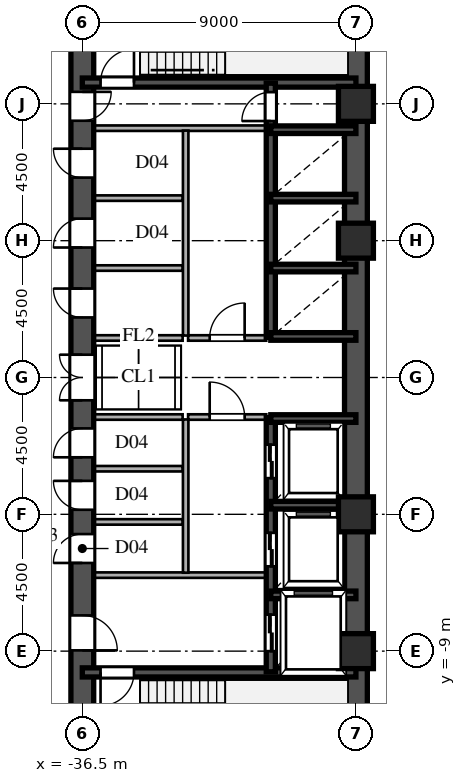
"""IFC4 building model, lengths in metres.
Left out: names, types, materials, properties, quantities, classifications, styles, units other than length and angle.
Written with IfcOpenShell. Run it as: python <this file> out.ifc"""

import sys

from ifc_helpers import new_model, si_unit, direction, frame, frame_2d, origin, origin_2d, place, context, subcontext, project, spatial, rectangle, hollow_rectangle, extrude, source, transform, mapped, element, fill, save


model = new_model("IFC4")
c1 = context("Model", 3, precision=1e-05, world=origin(), true_north=direction((0.0, 1.0)))
c2 = subcontext(c1, "Body", "Model", "MODEL_VIEW")
j1 = project(units=[si_unit("LENGTHUNIT", "METRE"), si_unit("PLANEANGLEUNIT", "RADIAN")], contexts=[c1])
p1 = place(None, origin())
s1 = spatial("IfcSite", under=j1, at=p1, CompositionType="ELEMENT")
p2 = place(p1, origin())
s2 = spatial("IfcBuilding", under=s1, at=p2, CompositionType="ELEMENT")
p3 = place(p2, frame((0.0, 0.0, 36.9)))
s3 = spatial("IfcBuildingStorey", under=s2, at=p3, CompositionType="ELEMENT", Elevation=36.9)
m1 = source(origin(), c2, "Body", "SweptSolid", [
    extrude(hollow_rectangle(XDim=1.15, YDim=1.15, WallThickness=0.048, at=origin_2d()), origin(), (0.0, 0.0, 1.0), 3.6),
])
for number, where, z_axis, x_axis in (
    (1, (-27.5, -9.0, 0.0), (0.0, 0.0, 1.0), (1.0, 0.0, 0.0)),
    (2, (-27.5, -4.5, 0.0), (0.0, 0.0, 1.0), (1.0, 0.0, 0.0)),
    (3, (-27.5, 4.5, 0.0), (0.0, 0.0, 1.0), (1.0, 0.0, 0.0)),
    (4, (-27.5, 9.0, 0.0), (0.0, 0.0, 1.0), (1.0, 0.0, 0.0)),
):
    element("IfcColumn", number, at=place(p3, frame(where, z_axis=z_axis, x_axis=x_axis)), inside=s3, PredefinedType="COLUMN", context=c2, shape_type="MappedRepresentation", body=[
        mapped(m1, transform((0.0, 0.0, 0.0), scale=1.0)),
    ])
for number, where, z_axis, x_axis in (
    (5, (-27.5, -13.5, 0.0), (0.0, 0.0, 1.0), (0.0, 1.0, 0.0)),
    (6, (-27.5, 1.3, 0.0), (0.0, 0.0, 1.0), (0.0, 1.0, 0.0)),
):
    element("IfcWall", number, at=place(p3, frame(where, z_axis=z_axis, x_axis=x_axis)), inside=s3, PredefinedType="SHEAR", context=c2, shape_type="SweptSolid", body=[
        extrude(rectangle(XDim=12.2, YDim=0.75, at=frame_2d((6.1, 0.0))), origin(), (0.0, 0.0, 1.0), 3.38),
    ])
p4 = place(p3, frame((-27.5, -1.3, 0.0), z_axis=(0.0, 0.0, 1.0), x_axis=(0.0, 1.0, 0.0)))
e7 = element("IfcWall", 7, at=p4, inside=s3, PredefinedType="SHEAR", context=c2, shape_type="SweptSolid", body=[
    extrude(rectangle(XDim=2.6, YDim=0.75, at=frame_2d((1.3, 0.0))), origin(), (0.0, 0.0, 1.0), 3.38),
])
p5 = place(p3, frame((-36.5, -13.65, 0.0), z_axis=(0.0, 0.0, 1.0), x_axis=(0.0, 1.0, 0.0)))
e8 = element("IfcWall", 8, at=p5, inside=s3, PredefinedType="SHEAR", context=c2, shape_type="SweptSolid", body=[
    extrude(rectangle(XDim=7.15, YDim=0.75, at=frame_2d((3.575, 0.0))), origin(), (0.0, 0.0, 1.0), 3.38),
])
p6 = place(p5, frame((4.675, 0.0, 0.0)))
e9 = element("IfcOpeningElement", 9, at=p6, cuts=e8, PredefinedType="OPENING", context=c2, shape_type="SweptSolid", body=[
    extrude(rectangle(XDim=1.15, YDim=2.2, at=frame_2d((0.575, 1.1))), frame((0.0, 0.385, 0.0), z_axis=(0.0, -1.0, 0.0), x_axis=(1.0, 0.0, 0.0)), (0.0, 0.0, 1.0), 0.77),
])
p7 = place(p3, frame((-36.5, -1.3, 0.0), z_axis=(0.0, 0.0, 1.0), x_axis=(0.0, 1.0, 0.0)))
e10 = element("IfcWall", 10, at=p7, inside=s3, PredefinedType="SHEAR", context=c2, shape_type="SweptSolid", body=[
    extrude(rectangle(XDim=2.6, YDim=0.75, at=frame_2d((1.3, 0.0))), origin(), (0.0, 0.0, 1.0), 3.38),
])
p8 = place(p7, frame((0.55, 0.0, 0.0)))
e11 = element("IfcOpeningElement", 11, at=p8, cuts=e10, PredefinedType="OPENING", context=c2, shape_type="SweptSolid", body=[
    extrude(rectangle(XDim=1.5, YDim=2.3, at=frame_2d((0.75, 1.15))), frame((0.0, 0.385, 0.0), z_axis=(0.0, -1.0, 0.0), x_axis=(1.0, 0.0, 0.0)), (0.0, 0.0, 1.0), 0.77),
])
p9 = place(p3, frame((-36.5, 8.2, 0.0), z_axis=(0.0, 0.0, 1.0), x_axis=(0.0, 1.0, 0.0)))
e12 = element("IfcWall", 12, at=p9, inside=s3, PredefinedType="SHEAR", context=c2, shape_type="SweptSolid", body=[
    extrude(rectangle(XDim=5.45, YDim=0.75, at=frame_2d((2.725, 0.0))), origin(), (0.0, 0.0, 1.0), 3.38),
])
p10 = place(p9, frame((0.245, 0.0, 0.0)))
e13 = element("IfcOpeningElement", 13, at=p10, cuts=e12, PredefinedType="OPENING", context=c2, shape_type="SweptSolid", body=[
    extrude(rectangle(XDim=0.95, YDim=2.15, at=frame_2d((0.475, 1.075))), frame((0.0, 0.385, 0.0), z_axis=(0.0, -1.0, 0.0), x_axis=(1.0, 0.0, 0.0)), (0.0, 0.0, 1.0), 0.77),
])
p11 = place(p3, frame((-36.5, -6.5, 0.0), z_axis=(0.0, 0.0, 1.0), x_axis=(0.0, 1.0, 0.0)))
e14 = element("IfcWall", 14, at=p11, inside=s3, PredefinedType="SHEAR", context=c2, shape_type="SweptSolid", body=[
    extrude(rectangle(XDim=1.75, YDim=0.75, at=frame_2d((0.875, 0.0))), origin(), (0.0, 0.0, 1.0), 3.38),
])
p12 = place(p11, frame((0.4, 0.0, 0.0)))
e15 = element("IfcOpeningElement", 15, at=p12, cuts=e14, PredefinedType="OPENING", context=c2, shape_type="SweptSolid", body=[
    extrude(rectangle(XDim=0.95, YDim=2.15, at=frame_2d((0.475, 1.075))), frame((0.0, 0.385, 0.0), z_axis=(0.0, -1.0, 0.0), x_axis=(1.0, 0.0, 0.0)), (0.0, 0.0, 1.0), 0.77),
])
p13 = place(p3, frame((-36.5, -4.75, 0.0), z_axis=(0.0, 0.0, 1.0), x_axis=(0.0, 1.0, 0.0)))
e16 = element("IfcWall", 16, at=p13, inside=s3, PredefinedType="SHEAR", context=c2, shape_type="SweptSolid", body=[
    extrude(rectangle(XDim=1.75, YDim=0.75, at=frame_2d((0.875, 0.0))), origin(), (0.0, 0.0, 1.0), 3.38),
])
p14 = place(p13, frame((0.4, 0.0, 0.0)))
e17 = element("IfcOpeningElement", 17, at=p14, cuts=e16, PredefinedType="OPENING", context=c2, shape_type="SweptSolid", body=[
    extrude(rectangle(XDim=0.95, YDim=2.15, at=frame_2d((0.475, 1.075))), frame((0.0, 0.385, 0.0), z_axis=(0.0, -1.0, 0.0), x_axis=(1.0, 0.0, 0.0)), (0.0, 0.0, 1.0), 0.77),
])
p15 = place(p3, frame((-36.5, -3.0, 0.0), z_axis=(0.0, 0.0, 1.0), x_axis=(0.0, 1.0, 0.0)))
e18 = element("IfcWall", 18, at=p15, inside=s3, PredefinedType="SHEAR", context=c2, shape_type="SweptSolid", body=[
    extrude(rectangle(XDim=1.7, YDim=0.75, at=frame_2d((0.85, 0.0))), origin(), (0.0, 0.0, 1.0), 3.38),
])
p16 = place(p15, frame((0.375, 0.0, 0.0)))
e19 = element("IfcOpeningElement", 19, at=p16, cuts=e18, PredefinedType="OPENING", context=c2, shape_type="SweptSolid", body=[
    extrude(rectangle(XDim=0.95, YDim=2.15, at=frame_2d((0.475, 1.075))), frame((0.0, 0.385, 0.0), z_axis=(0.0, -1.0, 0.0), x_axis=(1.0, 0.0, 0.0)), (0.0, 0.0, 1.0), 0.77),
])
p17 = place(p3, frame((-36.5, 1.3, 0.0), z_axis=(0.0, 0.0, 1.0), x_axis=(0.0, 1.0, 0.0)))
e20 = element("IfcWall", 20, at=p17, inside=s3, PredefinedType="SHEAR", context=c2, shape_type="SweptSolid", body=[
    extrude(rectangle(XDim=2.3, YDim=0.75, at=frame_2d((1.15, 0.0))), origin(), (0.0, 0.0, 1.0), 3.38),
])
p18 = place(p17, frame((0.675, 0.0, 0.0)))
e21 = element("IfcOpeningElement", 21, at=p18, cuts=e20, PredefinedType="OPENING", context=c2, shape_type="SweptSolid", body=[
    extrude(rectangle(XDim=0.95, YDim=2.15, at=frame_2d((0.475, 1.075))), frame((0.0, 0.385, 0.0), z_axis=(0.0, -1.0, 0.0), x_axis=(1.0, 0.0, 0.0)), (0.0, 0.0, 1.0), 0.77),
])
p19 = place(p3, frame((-36.5, 3.6, 0.0), z_axis=(0.0, 0.0, 1.0), x_axis=(0.0, 1.0, 0.0)))
e22 = element("IfcWall", 22, at=p19, inside=s3, PredefinedType="SHEAR", context=c2, shape_type="SweptSolid", body=[
    extrude(rectangle(XDim=2.3, YDim=0.75, at=frame_2d((1.15, 0.0))), origin(), (0.0, 0.0, 1.0), 3.38),
])
p20 = place(p19, frame((0.675, 0.0, 0.0)))
e23 = element("IfcOpeningElement", 23, at=p20, cuts=e22, PredefinedType="OPENING", context=c2, shape_type="SweptSolid", body=[
    extrude(rectangle(XDim=0.95, YDim=2.15, at=frame_2d((0.475, 1.075))), frame((0.0, 0.385, 0.0), z_axis=(0.0, -1.0, 0.0), x_axis=(1.0, 0.0, 0.0)), (0.0, 0.0, 1.0), 0.77),
])
p21 = place(p3, frame((-36.5, 5.9, 0.0), z_axis=(0.0, 0.0, 1.0), x_axis=(0.0, 1.0, 0.0)))
e24 = element("IfcWall", 24, at=p21, inside=s3, PredefinedType="SHEAR", context=c2, shape_type="SweptSolid", body=[
    extrude(rectangle(XDim=2.3, YDim=0.75, at=frame_2d((1.15, 0.0))), origin(), (0.0, 0.0, 1.0), 3.38),
])
p22 = place(p21, frame((0.675, 0.0, 0.0)))
e25 = element("IfcOpeningElement", 25, at=p22, cuts=e24, PredefinedType="OPENING", context=c2, shape_type="SweptSolid", body=[
    extrude(rectangle(XDim=0.95, YDim=2.15, at=frame_2d((0.475, 1.075))), frame((0.0, 0.385, 0.0), z_axis=(0.0, -1.0, 0.0), x_axis=(1.0, 0.0, 0.0)), (0.0, 0.0, 1.0), 0.77),
])
p23 = place(p3, frame((-36.5, -9.7, 0.0), z_axis=(0.0, 0.0, 1.0), x_axis=(1.0, 0.0, 0.0)))
e26 = element("IfcWall", 26, at=p23, inside=s3, PredefinedType="SHEAR", context=c2, shape_type="SweptSolid", body=[
    extrude(rectangle(XDim=9.0, YDim=0.3, at=frame_2d((4.5, 0.0))), origin(), (0.0, 0.0, 1.0), 3.38),
])
p24 = place(p23, frame((0.6, 0.0, 0.0)))
e27 = element("IfcOpeningElement", 27, at=p24, cuts=e26, PredefinedType="OPENING", context=c2, shape_type="SweptSolid", body=[
    extrude(rectangle(XDim=1.1, YDim=2.2, at=frame_2d((0.55, 1.1))), frame((0.0, 0.16, 0.0), z_axis=(0.0, -1.0, 0.0), x_axis=(1.0, 0.0, 0.0)), (0.0, 0.0, 1.0), 0.32),
])
p25 = place(p3, frame((-36.5, 9.7, 0.0), z_axis=(0.0, 0.0, 1.0), x_axis=(1.0, 0.0, 0.0)))
e28 = element("IfcWall", 28, at=p25, inside=s3, PredefinedType="SHEAR", context=c2, shape_type="SweptSolid", body=[
    extrude(rectangle(XDim=9.0, YDim=0.3, at=frame_2d((4.5, 0.0))), origin(), (0.0, 0.0, 1.0), 3.38),
])
p26 = place(p25, frame((0.6, 0.0, 0.0)))
e29 = element("IfcOpeningElement", 29, at=p26, cuts=e28, PredefinedType="OPENING", context=c2, shape_type="SweptSolid", body=[
    extrude(rectangle(XDim=1.1, YDim=2.2, at=frame_2d((0.55, 1.1))), frame((0.0, 0.16, 0.0), z_axis=(0.0, -1.0, 0.0), x_axis=(1.0, 0.0, 0.0)), (0.0, 0.0, 1.0), 0.32),
])
for number, where, z_axis, x_axis in (
    (30, (-30.3, -7.15, 0.0), (0.0, 0.0, 1.0), (1.0, 0.0, 0.0)),
    (31, (-30.3, -4.2, 0.0), (0.0, 0.0, 1.0), (1.0, 0.0, 0.0)),
    (32, (-30.3, -1.35, 0.0), (0.0, 0.0, 1.0), (1.0, 0.0, 0.0)),
    (33, (-30.3, 1.35, 0.0), (0.0, 0.0, 1.0), (1.0, 0.0, 0.0)),
    (34, (-30.3, 3.6, 0.0), (0.0, 0.0, 1.0), (1.0, 0.0, 0.0)),
    (35, (-30.3, 5.9, 0.0), (0.0, 0.0, 1.0), (1.0, 0.0, 0.0)),
    (36, (-30.3, 8.15, 0.0), (0.0, 0.0, 1.0), (1.0, 0.0, 0.0)),
):
    element("IfcWall", number, at=place(p3, frame(where, z_axis=z_axis, x_axis=x_axis)), inside=s3, PredefinedType="SHEAR", context=c2, shape_type="SweptSolid", body=[
        extrude(rectangle(XDim=2.8, YDim=0.25, at=frame_2d((1.4, 0.0))), origin(), (0.0, 0.0, 1.0), 3.38),
    ])
p27 = place(p3, frame((-30.3, -9.68, 0.0), z_axis=(0.0, 0.0, 1.0), x_axis=(0.0, 1.0, 0.0)))
e37 = element("IfcWall", 37, at=p27, inside=s3, PredefinedType="SHEAR", context=c2, shape_type="SweptSolid", body=[
    extrude(rectangle(XDim=2.56, YDim=0.3, at=frame_2d((1.28, 0.0))), origin(), (0.0, 0.0, 1.0), 3.38),
])
p28 = place(p27, frame((0.68, 0.0, 0.0)))
e38 = element("IfcOpeningElement", 38, at=p28, cuts=e37, PredefinedType="OPENING", context=c2, shape_type="SweptSolid", body=[
    extrude(rectangle(XDim=1.2, YDim=2.25, at=frame_2d((0.6, 1.125))), frame((0.0, 0.16, 0.0), z_axis=(0.0, -1.0, 0.0), x_axis=(1.0, 0.0, 0.0)), (0.0, 0.0, 1.0), 0.32),
])
p29 = place(p3, frame((-30.3, -7.12, 0.0), z_axis=(0.0, 0.0, 1.0), x_axis=(0.0, 1.0, 0.0)))
e39 = element("IfcWall", 39, at=p29, inside=s3, PredefinedType="SHEAR", context=c2, shape_type="SweptSolid", body=[
    extrude(rectangle(XDim=2.92, YDim=0.3, at=frame_2d((1.46, 0.0))), origin(), (0.0, 0.0, 1.0), 3.38),
])
p30 = place(p29, frame((0.91, 0.0, 0.0)))
e40 = element("IfcOpeningElement", 40, at=p30, cuts=e39, PredefinedType="OPENING", context=c2, shape_type="SweptSolid", body=[
    extrude(rectangle(XDim=1.1, YDim=2.2, at=frame_2d((0.55, 1.1))), frame((0.0, 0.16, 0.0), z_axis=(0.0, -1.0, 0.0), x_axis=(1.0, 0.0, 0.0)), (0.0, 0.0, 1.0), 0.32),
])
p31 = place(p3, frame((-30.3, -4.2, 0.0), z_axis=(0.0, 0.0, 1.0), x_axis=(0.0, 1.0, 0.0)))
e41 = element("IfcWall", 41, at=p31, inside=s3, PredefinedType="SHEAR", context=c2, shape_type="SweptSolid", body=[
    extrude(rectangle(XDim=2.88, YDim=0.3, at=frame_2d((1.44, 0.0))), origin(), (0.0, 0.0, 1.0), 3.38),
])
p32 = place(p31, frame((0.89, 0.0, 0.0)))
e42 = element("IfcOpeningElement", 42, at=p32, cuts=e41, PredefinedType="OPENING", context=c2, shape_type="SweptSolid", body=[
    extrude(rectangle(XDim=1.1, YDim=2.2, at=frame_2d((0.55, 1.1))), frame((0.0, 0.16, 0.0), z_axis=(0.0, -1.0, 0.0), x_axis=(1.0, 0.0, 0.0)), (0.0, 0.0, 1.0), 0.32),
])
p33 = place(p3, frame((-30.3, 1.32, 0.0), z_axis=(0.0, 0.0, 1.0), x_axis=(0.0, 1.0, 0.0)))
e43 = element("IfcWall", 43, at=p33, inside=s3, PredefinedType="SHEAR", context=c2, shape_type="SweptSolid", body=[
    extrude(rectangle(XDim=2.28, YDim=0.3, at=frame_2d((1.14, 0.0))), origin(), (0.0, 0.0, 1.0), 3.38),
])
p34 = place(p3, frame((-30.3, 3.6, 0.0), z_axis=(0.0, 0.0, 1.0), x_axis=(0.0, 1.0, 0.0)))
e44 = element("IfcWall", 44, at=p34, inside=s3, PredefinedType="SHEAR", context=c2, shape_type="SweptSolid", body=[
    extrude(rectangle(XDim=2.3, YDim=0.3, at=frame_2d((1.15, 0.0))), origin(), (0.0, 0.0, 1.0), 3.38),
])
p35 = place(p3, frame((-30.3, 5.9, 0.0), z_axis=(0.0, 0.0, 1.0), x_axis=(0.0, 1.0, 0.0)))
e45 = element("IfcWall", 45, at=p35, inside=s3, PredefinedType="SHEAR", context=c2, shape_type="SweptSolid", body=[
    extrude(rectangle(XDim=2.25, YDim=0.3, at=frame_2d((1.125, 0.0))), origin(), (0.0, 0.0, 1.0), 3.38),
])
p36 = place(p3, frame((-30.3, 8.15, 0.0), z_axis=(0.0, 0.0, 1.0), x_axis=(0.0, 1.0, 0.0)))
e46 = element("IfcWall", 46, at=p36, inside=s3, PredefinedType="SHEAR", context=c2, shape_type="SweptSolid", body=[
    extrude(rectangle(XDim=1.53, YDim=0.3, at=frame_2d((0.765, 0.0))), origin(), (0.0, 0.0, 1.0), 3.38),
])
p37 = place(p36, frame((0.285, 0.0, 0.0)))
e47 = element("IfcOpeningElement", 47, at=p37, cuts=e46, PredefinedType="OPENING", context=c2, shape_type="SweptSolid", body=[
    extrude(rectangle(XDim=0.95, YDim=2.15, at=frame_2d((0.475, 1.075))), frame((0.0, 0.16, 0.0), z_axis=(0.0, -1.0, 0.0), x_axis=(1.0, 0.0, 0.0)), (0.0, 0.0, 1.0), 0.32),
])
for number, where, z_axis, x_axis in (
    (48, (-36.15, -6.5, 0.0), (0.0, 0.0, 1.0), (1.0, 0.0, 0.0)),
    (49, (-36.15, 8.2, 0.0), (0.0, 0.0, 1.0), (1.0, 0.0, 0.0)),
):
    element("IfcWall", number, at=place(p3, frame(where, z_axis=z_axis, x_axis=x_axis)), inside=s3, PredefinedType="PARTITIONING", context=c2, shape_type="SweptSolid", body=[
        extrude(rectangle(XDim=5.7, YDim=0.18, at=frame_2d((2.85, 0.0))), origin(), (0.0, 0.0, 1.0), 3.38),
    ])
p38 = place(p3, frame((-33.1, -6.42, 0.0), z_axis=(0.0, 0.0, 1.0), x_axis=(0.0, 1.0, 0.0)))
e50 = element("IfcWall", 50, at=p38, inside=s3, PredefinedType="PARTITIONING", context=c2, shape_type="SweptSolid", body=[
    extrude(rectangle(XDim=5.04, YDim=0.18, at=frame_2d((2.52, 0.0))), origin(), (0.0, 0.0, 1.0), 3.38),
])
p39 = place(p3, frame((-33.1, 1.38, 0.0), z_axis=(0.0, 0.0, 1.0), x_axis=(0.0, 1.0, 0.0)))
e51 = element("IfcWall", 51, at=p39, inside=s3, PredefinedType="PARTITIONING", context=c2, shape_type="SweptSolid", body=[
    extrude(rectangle(XDim=6.74, YDim=0.18, at=frame_2d((3.37, 0.0))), origin(), (0.0, 0.0, 1.0), 3.38),
])
p40 = place(p3, frame((-33.02, -1.3, 0.0), z_axis=(0.0, 0.0, 1.0), x_axis=(1.0, 0.0, 0.0)))
e52 = element("IfcWall", 52, at=p40, inside=s3, PredefinedType="PARTITIONING", context=c2, shape_type="SweptSolid", body=[
    extrude(rectangle(XDim=2.57, YDim=0.18, at=frame_2d((1.285, 0.0))), origin(), (0.0, 0.0, 1.0), 3.38),
])
p41 = place(p40, frame((0.71, 0.0, 0.0)))
e53 = element("IfcOpeningElement", 53, at=p41, cuts=e52, PredefinedType="OPENING", context=c2, shape_type="SweptSolid", body=[
    extrude(rectangle(XDim=1.15, YDim=2.2, at=frame_2d((0.575, 1.1))), frame((0.0, 0.1, 0.0), z_axis=(0.0, -1.0, 0.0), x_axis=(1.0, 0.0, 0.0)), (0.0, 0.0, 1.0), 0.2),
])
p42 = place(p3, frame((-33.02, 1.3, 0.0), z_axis=(0.0, 0.0, 1.0), x_axis=(1.0, 0.0, 0.0)))
e54 = element("IfcWall", 54, at=p42, inside=s3, PredefinedType="PARTITIONING", context=c2, shape_type="SweptSolid", body=[
    extrude(rectangle(XDim=2.57, YDim=0.18, at=frame_2d((1.285, 0.0))), origin(), (0.0, 0.0, 1.0), 3.38),
])
p43 = place(p42, frame((0.71, 0.0, 0.0)))
e55 = element("IfcOpeningElement", 55, at=p43, cuts=e54, PredefinedType="OPENING", context=c2, shape_type="SweptSolid", body=[
    extrude(rectangle(XDim=1.15, YDim=2.2, at=frame_2d((0.575, 1.1))), frame((0.0, 0.1, 0.0), z_axis=(0.0, -1.0, 0.0), x_axis=(1.0, 0.0, 0.0)), (0.0, 0.0, 1.0), 0.2),
])
for number, where, z_axis, x_axis in (
    (56, (-36.15, -1.3, 0.0), (0.0, 0.0, 1.0), (1.0, 0.0, 0.0)),
    (57, (-36.15, 1.3, 0.0), (0.0, 0.0, 1.0), (1.0, 0.0, 0.0)),
    (58, (-36.15, -4.75, 0.0), (0.0, 0.0, 1.0), (1.0, 0.0, 0.0)),
    (59, (-36.15, -3.0, 0.0), (0.0, 0.0, 1.0), (1.0, 0.0, 0.0)),
    (60, (-36.15, 3.6, 0.0), (0.0, 0.0, 1.0), (1.0, 0.0, 0.0)),
    (61, (-36.15, 5.9, 0.0), (0.0, 0.0, 1.0), (1.0, 0.0, 0.0)),
):
    element("IfcWall", number, at=place(p3, frame(where, z_axis=z_axis, x_axis=x_axis)), inside=s3, PredefinedType="PARTITIONING", context=c2, shape_type="SweptSolid", body=[
        extrude(rectangle(XDim=2.95, YDim=0.18, at=frame_2d((1.475, 0.0))), origin(), (0.0, 0.0, 1.0), 3.38),
    ])
m2 = source(origin(), c2, "Body", "SweptSolid", [
    extrude(rectangle(XDim=1.15, YDim=2.2, at=frame_2d((0.575, 1.1))), frame((0.0, 0.025, 0.0), z_axis=(0.0, -1.0, 0.0), x_axis=(1.0, 0.0, 0.0)), (0.0, 0.0, 1.0), 0.05),
])
p44 = place(p6, frame((1.15, 0.0, 0.0), z_axis=(0.0, 0.0, 1.0), x_axis=(-1.0, 0.0, 0.0)))
e62 = element("IfcDoor", 62, at=p44, inside=s3, OperationType="SINGLE_SWING_LEFT", PredefinedType="DOOR", context=c2, shape_type="MappedRepresentation", body=[
    mapped(m2, transform((0.0, 0.0, 0.0), scale=1.0)),
])
fill(e9, e62)
m3 = source(origin(), c2, "Body", "SweptSolid", [
    extrude(rectangle(XDim=1.5, YDim=2.3, at=frame_2d((0.75, 1.15))), frame((0.0, 0.025, 0.0), z_axis=(0.0, -1.0, 0.0), x_axis=(1.0, 0.0, 0.0)), (0.0, 0.0, 1.0), 0.05),
])
p45 = place(p8, origin())
e63 = element("IfcDoor", 63, at=p45, inside=s3, OperationType="DOUBLE_SWING_LEFT", PredefinedType="DOOR", context=c2, shape_type="MappedRepresentation", body=[
    mapped(m3, transform((0.0, 0.0, 0.0), scale=1.0)),
])
fill(e11, e63)
m4 = source(origin(), c2, "Body", "SweptSolid", [
    extrude(rectangle(XDim=0.95, YDim=2.15, at=frame_2d((0.475, 1.075))), frame((0.0, 0.025, 0.0), z_axis=(0.0, -1.0, 0.0), x_axis=(1.0, 0.0, 0.0)), (0.0, 0.0, 1.0), 0.05),
])
p46 = place(p10, frame((0.95, 0.0, 0.0), z_axis=(0.0, 0.0, 1.0), x_axis=(-1.0, 0.0, 0.0)))
e64 = element("IfcDoor", 64, at=p46, inside=s3, OperationType="SINGLE_SWING_RIGHT", PredefinedType="DOOR", context=c2, shape_type="MappedRepresentation", body=[
    mapped(m4, transform((0.0, 0.0, 0.0), scale=1.0)),
])
fill(e13, e64)
p47 = place(p12, origin())
e65 = element("IfcDoor", 65, at=p47, inside=s3, OperationType="SINGLE_SWING_LEFT", PredefinedType="DOOR", context=c2, shape_type="MappedRepresentation", body=[
    mapped(m4, transform((0.0, 0.0, 0.0), scale=1.0)),
])
fill(e15, e65)
p48 = place(p14, origin())
e66 = element("IfcDoor", 66, at=p48, inside=s3, OperationType="SINGLE_SWING_RIGHT", PredefinedType="DOOR", context=c2, shape_type="MappedRepresentation", body=[
    mapped(m4, transform((0.0, 0.0, 0.0), scale=1.0)),
])
fill(e17, e66)
p49 = place(p16, origin())
e67 = element("IfcDoor", 67, at=p49, inside=s3, OperationType="SINGLE_SWING_LEFT", PredefinedType="DOOR", context=c2, shape_type="MappedRepresentation", body=[
    mapped(m4, transform((0.0, 0.0, 0.0), scale=1.0)),
])
fill(e19, e67)
p50 = place(p18, origin())
e68 = element("IfcDoor", 68, at=p50, inside=s3, OperationType="SINGLE_SWING_RIGHT", PredefinedType="DOOR", context=c2, shape_type="MappedRepresentation", body=[
    mapped(m4, transform((0.0, 0.0, 0.0), scale=1.0)),
])
fill(e21, e68)
p51 = place(p20, origin())
e69 = element("IfcDoor", 69, at=p51, inside=s3, OperationType="SINGLE_SWING_LEFT", PredefinedType="DOOR", context=c2, shape_type="MappedRepresentation", body=[
    mapped(m4, transform((0.0, 0.0, 0.0), scale=1.0)),
])
fill(e23, e69)
p52 = place(p22, origin())
e70 = element("IfcDoor", 70, at=p52, inside=s3, OperationType="SINGLE_SWING_RIGHT", PredefinedType="DOOR", context=c2, shape_type="MappedRepresentation", body=[
    mapped(m4, transform((0.0, 0.0, 0.0), scale=1.0)),
])
fill(e25, e70)
m5 = source(origin(), c2, "Body", "SweptSolid", [
    extrude(rectangle(XDim=1.1, YDim=2.2, at=frame_2d((0.55, 1.1))), frame((0.0, 0.025, 0.0), z_axis=(0.0, -1.0, 0.0), x_axis=(1.0, 0.0, 0.0)), (0.0, 0.0, 1.0), 0.05),
])
p53 = place(p24, frame((1.1, 0.0, 0.0), z_axis=(0.0, 0.0, 1.0), x_axis=(-1.0, 0.0, 0.0)))
e71 = element("IfcDoor", 71, at=p53, inside=s3, OperationType="SINGLE_SWING_LEFT", PredefinedType="DOOR", context=c2, shape_type="MappedRepresentation", body=[
    mapped(m5, transform((0.0, 0.0, 0.0), scale=1.0)),
])
fill(e27, e71)
p54 = place(p26, origin())
e72 = element("IfcDoor", 72, at=p54, inside=s3, OperationType="SINGLE_SWING_RIGHT", PredefinedType="DOOR", context=c2, shape_type="MappedRepresentation", body=[
    mapped(m5, transform((0.0, 0.0, 0.0), scale=1.0)),
])
fill(e29, e72)
m6 = source(origin(), c2, "Body", "SweptSolid", [
    extrude(rectangle(XDim=1.2, YDim=2.25, at=frame_2d((0.6, 1.125))), frame((0.0, 0.025, 0.0), z_axis=(0.0, -1.0, 0.0), x_axis=(1.0, 0.0, 0.0)), (0.0, 0.0, 1.0), 0.05),
])
p55 = place(p28, origin())
e73 = element("IfcDoor", 73, at=p55, inside=s3, OperationType="DOUBLE_DOOR_SLIDING", PredefinedType="DOOR", context=c2, shape_type="MappedRepresentation", body=[
    mapped(m6, transform((0.0, 0.0, 0.0), scale=1.0)),
])
fill(e38, e73)
m7 = source(origin(), c2, "Body", "SweptSolid", [
    extrude(rectangle(XDim=1.1, YDim=2.2, at=frame_2d((0.55, 1.1))), frame((0.0, 0.025, 0.0), z_axis=(0.0, -1.0, 0.0), x_axis=(1.0, 0.0, 0.0)), (0.0, 0.0, 1.0), 0.05),
])
p56 = place(p30, origin())
e74 = element("IfcDoor", 74, at=p56, inside=s3, OperationType="DOUBLE_DOOR_SLIDING", PredefinedType="DOOR", context=c2, shape_type="MappedRepresentation", body=[
    mapped(m7, transform((0.0, 0.0, 0.0), scale=1.0)),
])
fill(e40, e74)
p57 = place(p32, origin())
e75 = element("IfcDoor", 75, at=p57, inside=s3, OperationType="DOUBLE_DOOR_SLIDING", PredefinedType="DOOR", context=c2, shape_type="MappedRepresentation", body=[
    mapped(m7, transform((0.0, 0.0, 0.0), scale=1.0)),
])
fill(e42, e75)
p58 = place(p37, origin())
e76 = element("IfcDoor", 76, at=p58, inside=s3, OperationType="SINGLE_SWING_LEFT", PredefinedType="DOOR", context=c2, shape_type="MappedRepresentation", body=[
    mapped(m4, transform((0.0, 0.0, 0.0), scale=1.0)),
])
fill(e47, e76)
p59 = place(p41, origin())
e77 = element("IfcDoor", 77, at=p59, inside=s3, OperationType="SINGLE_SWING_LEFT", PredefinedType="DOOR", context=c2, shape_type="MappedRepresentation", body=[
    mapped(m2, transform((0.0, 0.0, 0.0), scale=1.0)),
])
fill(e53, e77)
p60 = place(p43, origin())
e78 = element("IfcDoor", 78, at=p60, inside=s3, OperationType="SINGLE_SWING_RIGHT", PredefinedType="DOOR", context=c2, shape_type="MappedRepresentation", body=[
    mapped(m2, transform((0.0, 0.0, 0.0), scale=1.0)),
])
fill(e55, e78)
save(model, sys.argv[1])
